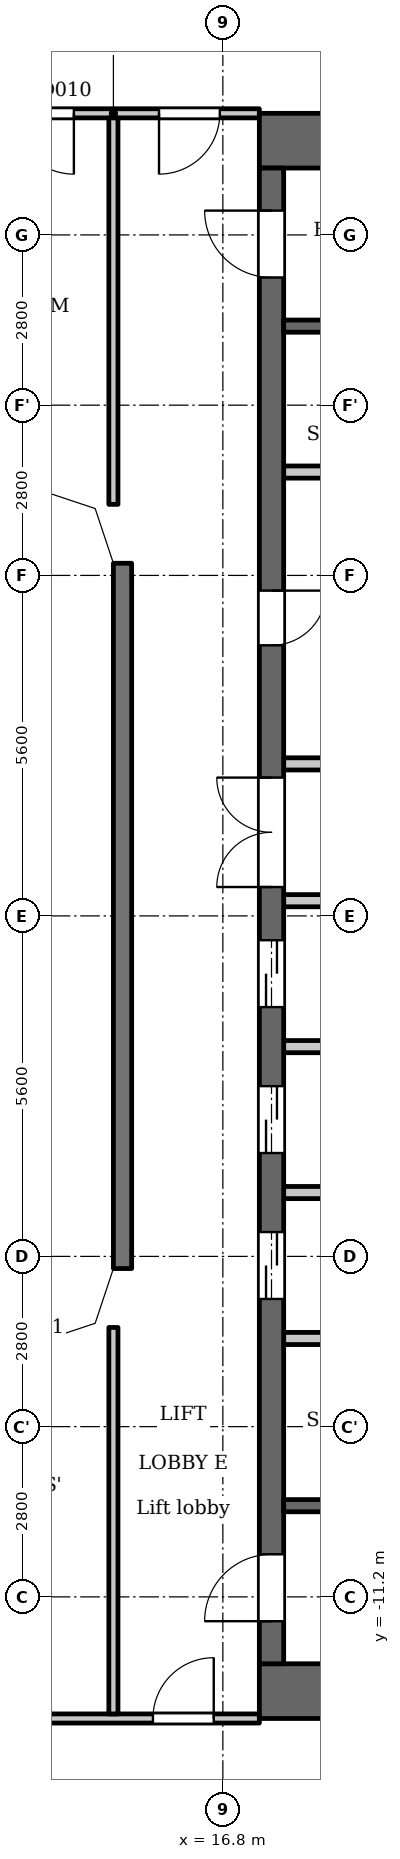
"""IFC4 building model, lengths in metres.
Left out: names, types, materials, properties, quantities, classifications, styles, units other than length and angle.
Written with IfcOpenShell. Run it as: python <this file> out.ifc"""

import sys

from ifc_helpers import new_model, si_unit, direction, frame, frame_2d, origin, place, context, subcontext, project, spatial, polyline, rectangle, outline, extrude, element, fill, save


model = new_model("IFC4")
c1 = context("Model", 3, precision=1e-05, world=origin(), true_north=direction((0.0, 1.0)))
c2 = subcontext(c1, "Body", "Model", "MODEL_VIEW")
j1 = project(units=[si_unit("LENGTHUNIT", "METRE"), si_unit("PLANEANGLEUNIT", "RADIAN")], contexts=[c1])
p1 = place(None, origin())
s1 = spatial("IfcSite", under=j1, at=p1, CompositionType="ELEMENT")
p2 = place(p1, origin())
s2 = spatial("IfcBuilding", under=s1, at=p2, CompositionType="ELEMENT")
p3 = place(p2, frame((0.0, 0.0, 37.5)))
s3 = spatial("IfcBuildingStorey", under=s2, at=p3, CompositionType="ELEMENT", Elevation=37.5)
p4 = place(p3, frame((15.15, 5.8, 0.0), z_axis=(0.0, 0.0, 1.0), x_axis=(0.0, -1.0, 0.0)))
e1 = element("IfcWall", 1, at=p4, inside=s3, PredefinedType="SOLIDWALL", context=c2, shape_type="SweptSolid", body=[
    extrude(rectangle(XDim=11.6, YDim=0.3, at=frame_2d((5.8, 0.0))), origin(), (0.0, 0.0, 1.0), 3.2),
])
for number, where, z_axis, x_axis in (
    (2, (17.4, 12.75, 0.0), (0.0, 0.0, 1.0), (1.0, 0.0, 0.0)),
    (3, (17.4, -12.75, 0.0), (0.0, 0.0, 1.0), (1.0, 0.0, 0.0)),
):
    element("IfcWall", number, at=place(p3, frame(where, z_axis=z_axis, x_axis=x_axis)), inside=s3, PredefinedType="SHEAR", context=c2, shape_type="SweptSolid", body=[
        extrude(rectangle(XDim=10.4, YDim=0.9, at=frame_2d((5.2, 0.0))), origin(), (0.0, 0.0, 1.0), 3.2),
    ])
p5 = place(p3, frame((17.6, -12.3, 0.0), z_axis=(0.0, 0.0, 1.0), x_axis=(0.0, 1.0, 0.0)))
e4 = element("IfcWall", 4, at=p5, inside=s3, PredefinedType="SHEAR", context=c2, shape_type="SweptSolid", body=[
    extrude(rectangle(XDim=24.6, YDim=0.4, at=frame_2d((12.3, 0.0))), origin(), (0.0, 0.0, 1.0), 3.2),
])
p6 = place(p5, frame((6.0, 0.0, 0.0)))
e5 = element("IfcOpeningElement", 5, at=p6, cuts=e4, PredefinedType="OPENING", context=c2, shape_type="SweptSolid", body=[
    extrude(rectangle(XDim=1.1, YDim=2.1, at=frame_2d((0.55, 1.05))), frame((0.0, 0.21, 0.0), z_axis=(0.0, -1.0, 0.0), x_axis=(1.0, 0.0, 0.0)), (0.0, 0.0, 1.0), 0.42),
])
p7 = place(p5, frame((8.4, 0.0, 0.0)))
e6 = element("IfcOpeningElement", 6, at=p7, cuts=e4, PredefinedType="OPENING", context=c2, shape_type="SweptSolid", body=[
    extrude(rectangle(XDim=1.1, YDim=2.1, at=frame_2d((0.55, 1.05))), frame((0.0, 0.21, 0.0), z_axis=(0.0, -1.0, 0.0), x_axis=(1.0, 0.0, 0.0)), (0.0, 0.0, 1.0), 0.42),
])
p8 = place(p5, frame((10.8, 0.0, 0.0)))
e7 = element("IfcOpeningElement", 7, at=p8, cuts=e4, PredefinedType="OPENING", context=c2, shape_type="SweptSolid", body=[
    extrude(rectangle(XDim=1.1, YDim=2.1, at=frame_2d((0.55, 1.05))), frame((0.0, 0.21, 0.0), z_axis=(0.0, -1.0, 0.0), x_axis=(1.0, 0.0, 0.0)), (0.0, 0.0, 1.0), 0.42),
])
p9 = place(p5, frame((16.75, 0.0, 0.0)))
e8 = element("IfcOpeningElement", 8, at=p9, cuts=e4, PredefinedType="OPENING", context=c2, shape_type="SweptSolid", body=[
    extrude(rectangle(XDim=0.9, YDim=2.1, at=frame_2d((0.45, 1.05))), frame((0.0, 0.21, 0.0), z_axis=(0.0, -1.0, 0.0), x_axis=(1.0, 0.0, 0.0)), (0.0, 0.0, 1.0), 0.42),
])
p10 = place(p5, frame((22.8, 0.0, 0.0)))
e9 = element("IfcOpeningElement", 9, at=p10, cuts=e4, PredefinedType="OPENING", context=c2, shape_type="SweptSolid", body=[
    extrude(rectangle(XDim=1.1, YDim=2.1, at=frame_2d((0.55, 1.05))), frame((0.0, 0.21, 0.0), z_axis=(0.0, -1.0, 0.0), x_axis=(1.0, 0.0, 0.0)), (0.0, 0.0, 1.0), 0.42),
])
p11 = place(p5, frame((0.7, 0.0, 0.0)))
e10 = element("IfcOpeningElement", 10, at=p11, cuts=e4, PredefinedType="OPENING", context=c2, shape_type="SweptSolid", body=[
    extrude(rectangle(XDim=1.1, YDim=2.1, at=frame_2d((0.55, 1.05))), frame((0.0, 0.21, 0.0), z_axis=(0.0, -1.0, 0.0), x_axis=(1.0, 0.0, 0.0)), (0.0, 0.0, 1.0), 0.42),
])
p12 = place(p5, frame((12.775, 0.0, 0.0)))
e11 = element("IfcOpeningElement", 11, at=p12, cuts=e4, PredefinedType="OPENING", context=c2, shape_type="SweptSolid", body=[
    extrude(rectangle(XDim=1.8, YDim=2.1, at=frame_2d((0.9, 1.05))), frame((0.0, 0.21, 0.0), z_axis=(0.0, -1.0, 0.0), x_axis=(1.0, 0.0, 0.0)), (0.0, 0.0, 1.0), 0.42),
])
p13 = place(p3, frame((17.8, -9.7, 0.0), z_axis=(0.0, 0.0, 1.0), x_axis=(1.0, 0.0, 0.0)))
e12 = element("IfcWall", 12, at=p13, inside=s3, PredefinedType="SHEAR", context=c2, shape_type="SweptSolid", body=[
    extrude(rectangle(XDim=8.3, YDim=0.2, at=frame_2d((4.15, 0.0))), origin(), (0.0, 0.0, 1.0), 3.2),
])
p14 = place(p13, frame((0.85, 0.0, 0.0)))
e13 = element("IfcOpeningElement", 13, at=p14, cuts=e12, PredefinedType="OPENING", context=c2, shape_type="SweptSolid", body=[
    extrude(rectangle(XDim=1.1, YDim=2.1, at=frame_2d((0.55, 1.05))), frame((0.0, 0.11, 0.0), z_axis=(0.0, -1.0, 0.0), x_axis=(1.0, 0.0, 0.0)), (0.0, 0.0, 1.0), 0.22),
])
p15 = place(p13, frame((3.75, 0.0, 0.0)))
e14 = element("IfcOpeningElement", 14, at=p15, cuts=e12, PredefinedType="OPENING", context=c2, shape_type="SweptSolid", body=[
    extrude(rectangle(XDim=1.1, YDim=2.1, at=frame_2d((0.55, 1.05))), frame((0.0, 0.11, 0.0), z_axis=(0.0, -1.0, 0.0), x_axis=(1.0, 0.0, 0.0)), (0.0, 0.0, 1.0), 0.22),
])
for number, where, z_axis, x_axis in (
    (15, (17.8, -6.95, 0.0), (0.0, 0.0, 1.0), (1.0, 0.0, 0.0)),
    (16, (17.8, -4.55, 0.0), (0.0, 0.0, 1.0), (1.0, 0.0, 0.0)),
    (17, (17.8, -2.15, 0.0), (0.0, 0.0, 1.0), (1.0, 0.0, 0.0)),
):
    element("IfcWall", number, at=place(p3, frame(where, z_axis=z_axis, x_axis=x_axis)), inside=s3, PredefinedType="PARTITIONING", context=c2, shape_type="SweptSolid", body=[
        extrude(rectangle(XDim=2.8, YDim=0.2, at=frame_2d((1.4, 0.0))), origin(), (0.0, 0.0, 1.0), 3.2),
    ])
for number, where, z_axis, x_axis in (
    (18, (17.8, 0.25, 0.0), (0.0, 0.0, 1.0), (1.0, 0.0, 0.0)),
    (19, (17.8, 2.5, 0.0), (0.0, 0.0, 1.0), (1.0, 0.0, 0.0)),
):
    element("IfcWall", number, at=place(p3, frame(where, z_axis=z_axis, x_axis=x_axis)), inside=s3, PredefinedType="PARTITIONING", context=c2, shape_type="SweptSolid", body=[
        extrude(rectangle(XDim=3.0, YDim=0.2, at=frame_2d((1.5, 0.0))), origin(), (0.0, 0.0, 1.0), 3.2),
    ])
p16 = place(p3, frame((17.8, 7.3, 0.0), z_axis=(0.0, 0.0, 1.0), x_axis=(1.0, 0.0, 0.0)))
e20 = element("IfcWall", 20, at=p16, inside=s3, PredefinedType="PARTITIONING", context=c2, shape_type="SweptSolid", body=[
    extrude(rectangle(XDim=2.8, YDim=0.2, at=frame_2d((1.4, 0.0))), origin(), (0.0, 0.0, 1.0), 3.2),
])
p17 = place(p3, frame((17.8, 9.7, 0.0), z_axis=(0.0, 0.0, 1.0), x_axis=(1.0, 0.0, 0.0)))
e21 = element("IfcWall", 21, at=p17, inside=s3, PredefinedType="SHEAR", context=c2, shape_type="SweptSolid", body=[
    extrude(rectangle(XDim=8.3, YDim=0.2, at=frame_2d((4.15, 0.0))), origin(), (0.0, 0.0, 1.0), 3.2),
])
p18 = place(p17, frame((0.85, 0.0, 0.0)))
e22 = element("IfcOpeningElement", 22, at=p18, cuts=e21, PredefinedType="OPENING", context=c2, shape_type="SweptSolid", body=[
    extrude(rectangle(XDim=1.1, YDim=2.1, at=frame_2d((0.55, 1.05))), frame((0.0, 0.11, 0.0), z_axis=(0.0, -1.0, 0.0), x_axis=(1.0, 0.0, 0.0)), (0.0, 0.0, 1.0), 0.22),
])
p19 = place(p17, frame((3.75, 0.0, 0.0)))
e23 = element("IfcOpeningElement", 23, at=p19, cuts=e21, PredefinedType="OPENING", context=c2, shape_type="SweptSolid", body=[
    extrude(rectangle(XDim=1.1, YDim=2.1, at=frame_2d((0.55, 1.05))), frame((0.0, 0.11, 0.0), z_axis=(0.0, -1.0, 0.0), x_axis=(1.0, 0.0, 0.0)), (0.0, 0.0, 1.0), 0.22),
])
p20 = place(p3, frame((-17.4, -13.2, 0.0), z_axis=(0.0, 0.0, 1.0), x_axis=(1.0, 0.0, 0.0)))
e24 = element("IfcWall", 24, at=p20, inside=s3, PredefinedType="PARTITIONING", context=c2, shape_type="SweptSolid", body=[
    extrude(rectangle(XDim=34.8, YDim=0.15, at=frame_2d((17.4, 0.0))), origin(), (0.0, 0.0, 1.0), 3.2),
])
p21 = place(p20, frame((0.65, 0.0, 0.0)))
e25 = element("IfcOpeningElement", 25, at=p21, cuts=e24, PredefinedType="OPENING", context=c2, shape_type="SweptSolid", body=[
    extrude(rectangle(XDim=1.0, YDim=2.1, at=frame_2d((0.5, 1.05))), frame((0.0, 0.085, 0.0), z_axis=(0.0, -1.0, 0.0), x_axis=(1.0, 0.0, 0.0)), (0.0, 0.0, 1.0), 0.17),
])
p22 = place(p20, frame((33.05, 0.0, 0.0)))
e26 = element("IfcOpeningElement", 26, at=p22, cuts=e24, PredefinedType="OPENING", context=c2, shape_type="SweptSolid", body=[
    extrude(rectangle(XDim=1.0, YDim=2.1, at=frame_2d((0.5, 1.05))), frame((0.0, 0.085, 0.0), z_axis=(0.0, -1.0, 0.0), x_axis=(1.0, 0.0, 0.0)), (0.0, 0.0, 1.0), 0.17),
])
p23 = place(p20, frame((4.55, 0.0, 0.0)))
e27 = element("IfcOpeningElement", 27, at=p23, cuts=e24, PredefinedType="OPENING", context=c2, shape_type="SweptSolid", body=[
    extrude(rectangle(XDim=1.0, YDim=2.1, at=frame_2d((0.5, 1.05))), frame((0.0, 0.085, 0.0), z_axis=(0.0, -1.0, 0.0), x_axis=(1.0, 0.0, 0.0)), (0.0, 0.0, 1.0), 0.17),
])
p24 = place(p20, frame((6.9, 0.0, 0.0)))
e28 = element("IfcOpeningElement", 28, at=p24, cuts=e24, PredefinedType="OPENING", context=c2, shape_type="SweptSolid", body=[
    extrude(rectangle(XDim=1.0, YDim=2.1, at=frame_2d((0.5, 1.05))), frame((0.0, 0.085, 0.0), z_axis=(0.0, -1.0, 0.0), x_axis=(1.0, 0.0, 0.0)), (0.0, 0.0, 1.0), 0.17),
])
p25 = place(p20, frame((15.75, 0.0, 0.0)))
e29 = element("IfcOpeningElement", 29, at=p25, cuts=e24, PredefinedType="OPENING", context=c2, shape_type="SweptSolid", body=[
    extrude(rectangle(XDim=1.0, YDim=2.1, at=frame_2d((0.5, 1.05))), frame((0.0, 0.085, 0.0), z_axis=(0.0, -1.0, 0.0), x_axis=(1.0, 0.0, 0.0)), (0.0, 0.0, 1.0), 0.17),
])
p26 = place(p20, frame((18.1, 0.0, 0.0)))
e30 = element("IfcOpeningElement", 30, at=p26, cuts=e24, PredefinedType="OPENING", context=c2, shape_type="SweptSolid", body=[
    extrude(rectangle(XDim=1.0, YDim=2.1, at=frame_2d((0.5, 1.05))), frame((0.0, 0.085, 0.0), z_axis=(0.0, -1.0, 0.0), x_axis=(1.0, 0.0, 0.0)), (0.0, 0.0, 1.0), 0.17),
])
p27 = place(p20, frame((26.95, 0.0, 0.0)))
e31 = element("IfcOpeningElement", 31, at=p27, cuts=e24, PredefinedType="OPENING", context=c2, shape_type="SweptSolid", body=[
    extrude(rectangle(XDim=1.0, YDim=2.1, at=frame_2d((0.5, 1.05))), frame((0.0, 0.085, 0.0), z_axis=(0.0, -1.0, 0.0), x_axis=(1.0, 0.0, 0.0)), (0.0, 0.0, 1.0), 0.17),
])
p28 = place(p20, frame((29.25, 0.0, 0.0)))
e32 = element("IfcOpeningElement", 32, at=p28, cuts=e24, PredefinedType="OPENING", context=c2, shape_type="SweptSolid", body=[
    extrude(rectangle(XDim=1.0, YDim=2.1, at=frame_2d((0.5, 1.05))), frame((0.0, 0.085, 0.0), z_axis=(0.0, -1.0, 0.0), x_axis=(1.0, 0.0, 0.0)), (0.0, 0.0, 1.0), 0.17),
])
p29 = place(p3, frame((-17.4, 13.2, 0.0), z_axis=(0.0, 0.0, 1.0), x_axis=(1.0, 0.0, 0.0)))
e33 = element("IfcWall", 33, at=p29, inside=s3, PredefinedType="PARTITIONING", context=c2, shape_type="SweptSolid", body=[
    extrude(rectangle(XDim=34.8, YDim=0.15, at=frame_2d((17.4, 0.0))), origin(), (0.0, 0.0, 1.0), 3.2),
])
p30 = place(p29, frame((0.75, 0.0, 0.0)))
e34 = element("IfcOpeningElement", 34, at=p30, cuts=e33, PredefinedType="OPENING", context=c2, shape_type="SweptSolid", body=[
    extrude(rectangle(XDim=1.0, YDim=2.1, at=frame_2d((0.5, 1.05))), frame((0.0, 0.085, 0.0), z_axis=(0.0, -1.0, 0.0), x_axis=(1.0, 0.0, 0.0)), (0.0, 0.0, 1.0), 0.17),
])
p31 = place(p29, frame((33.15, 0.0, 0.0)))
e35 = element("IfcOpeningElement", 35, at=p31, cuts=e33, PredefinedType="OPENING", context=c2, shape_type="SweptSolid", body=[
    extrude(rectangle(XDim=1.0, YDim=2.1, at=frame_2d((0.5, 1.05))), frame((0.0, 0.085, 0.0), z_axis=(0.0, -1.0, 0.0), x_axis=(1.0, 0.0, 0.0)), (0.0, 0.0, 1.0), 0.17),
])
p32 = place(p29, frame((3.05, 0.0, 0.0)))
e36 = element("IfcOpeningElement", 36, at=p32, cuts=e33, PredefinedType="OPENING", context=c2, shape_type="SweptSolid", body=[
    extrude(rectangle(XDim=1.0, YDim=2.1, at=frame_2d((0.5, 1.05))), frame((0.0, 0.085, 0.0), z_axis=(0.0, -1.0, 0.0), x_axis=(1.0, 0.0, 0.0)), (0.0, 0.0, 1.0), 0.17),
])
p33 = place(p29, frame((10.1, 0.0, 0.0)))
e37 = element("IfcOpeningElement", 37, at=p33, cuts=e33, PredefinedType="OPENING", context=c2, shape_type="SweptSolid", body=[
    extrude(rectangle(XDim=1.0, YDim=2.1, at=frame_2d((0.5, 1.05))), frame((0.0, 0.085, 0.0), z_axis=(0.0, -1.0, 0.0), x_axis=(1.0, 0.0, 0.0)), (0.0, 0.0, 1.0), 0.17),
])
p34 = place(p29, frame((12.45, 0.0, 0.0)))
e38 = element("IfcOpeningElement", 38, at=p34, cuts=e33, PredefinedType="OPENING", context=c2, shape_type="SweptSolid", body=[
    extrude(rectangle(XDim=1.0, YDim=2.1, at=frame_2d((0.5, 1.05))), frame((0.0, 0.085, 0.0), z_axis=(0.0, -1.0, 0.0), x_axis=(1.0, 0.0, 0.0)), (0.0, 0.0, 1.0), 0.17),
])
p35 = place(p29, frame((21.3, 0.0, 0.0)))
e39 = element("IfcOpeningElement", 39, at=p35, cuts=e33, PredefinedType="OPENING", context=c2, shape_type="SweptSolid", body=[
    extrude(rectangle(XDim=1.0, YDim=2.1, at=frame_2d((0.5, 1.05))), frame((0.0, 0.085, 0.0), z_axis=(0.0, -1.0, 0.0), x_axis=(1.0, 0.0, 0.0)), (0.0, 0.0, 1.0), 0.17),
])
p36 = place(p29, frame((23.65, 0.0, 0.0)))
e40 = element("IfcOpeningElement", 40, at=p36, cuts=e33, PredefinedType="OPENING", context=c2, shape_type="SweptSolid", body=[
    extrude(rectangle(XDim=1.0, YDim=2.1, at=frame_2d((0.5, 1.05))), frame((0.0, 0.085, 0.0), z_axis=(0.0, -1.0, 0.0), x_axis=(1.0, 0.0, 0.0)), (0.0, 0.0, 1.0), 0.17),
])
p37 = place(p29, frame((30.75, 0.0, 0.0)))
e41 = element("IfcOpeningElement", 41, at=p37, cuts=e33, PredefinedType="OPENING", context=c2, shape_type="SweptSolid", body=[
    extrude(rectangle(XDim=1.0, YDim=2.1, at=frame_2d((0.5, 1.05))), frame((0.0, 0.085, 0.0), z_axis=(0.0, -1.0, 0.0), x_axis=(1.0, 0.0, 0.0)), (0.0, 0.0, 1.0), 0.17),
])
for number, where, z_axis, x_axis in (
    (42, (15.0, -13.125, 0.0), (0.0, 0.0, 1.0), (0.0, 1.0, 0.0)),
    (43, (15.0, 6.769, 0.0), (0.0, 0.0, 1.0), (0.0, 1.0, 0.0)),
):
    element("IfcWall", number, at=place(p3, frame(where, z_axis=z_axis, x_axis=x_axis)), inside=s3, PredefinedType="PARTITIONING", context=c2, shape_type="SweptSolid", body=[
        extrude(rectangle(XDim=6.356, YDim=0.15, at=frame_2d((3.178, 0.0))), origin(), (0.0, 0.0, 1.0), 3.2),
    ])
p38 = place(p3, origin())
e44 = element("IfcWall", 44, at=p38, inside=s3, PredefinedType="SOLIDWALL", context=c2, shape_type="SweptSolid", body=[
    extrude(outline(polyline([(14.937, 6.937), (13.849, 7.3), (13.8, 7.3), (13.8, 7.0), (14.7, 6.7), (15.0, 5.8), (15.3, 5.8), (15.3, 5.849), (14.937, 6.937)])), origin(), (0.0, 0.0, 1.0), 3.2),
])
e45 = element("IfcWall", 45, at=p38, inside=s3, PredefinedType="SOLIDWALL", context=c2, shape_type="SweptSolid", body=[
    extrude(outline(polyline([(14.937, -6.937), (15.3, -5.849), (15.3, -5.8), (15.0, -5.8), (14.7, -6.7), (13.8, -7.0), (13.8, -7.3), (13.849, -7.3), (14.937, -6.937)])), origin(), (0.0, 0.0, 1.0), 3.2),
])
p39 = place(p6, origin())
e46 = element("IfcDoor", 46, at=p39, inside=s3, OperationType="DOUBLE_DOOR_SLIDING", PredefinedType="DOOR", context=c2, shape_type="SweptSolid", body=[
    extrude(rectangle(XDim=1.1, YDim=2.1, at=frame_2d((0.55, 1.05))), frame((0.0, 0.025, 0.0), z_axis=(0.0, -1.0, 0.0), x_axis=(1.0, 0.0, 0.0)), (0.0, 0.0, 1.0), 0.05),
])
fill(e5, e46)
p40 = place(p7, origin())
e47 = element("IfcDoor", 47, at=p40, inside=s3, OperationType="DOUBLE_DOOR_SLIDING", PredefinedType="DOOR", context=c2, shape_type="SweptSolid", body=[
    extrude(rectangle(XDim=1.1, YDim=2.1, at=frame_2d((0.55, 1.05))), frame((0.0, 0.025, 0.0), z_axis=(0.0, -1.0, 0.0), x_axis=(1.0, 0.0, 0.0)), (0.0, 0.0, 1.0), 0.05),
])
fill(e6, e47)
p41 = place(p8, origin())
e48 = element("IfcDoor", 48, at=p41, inside=s3, OperationType="DOUBLE_DOOR_SLIDING", PredefinedType="DOOR", context=c2, shape_type="SweptSolid", body=[
    extrude(rectangle(XDim=1.1, YDim=2.1, at=frame_2d((0.55, 1.05))), frame((0.0, 0.025, 0.0), z_axis=(0.0, -1.0, 0.0), x_axis=(1.0, 0.0, 0.0)), (0.0, 0.0, 1.0), 0.05),
])
fill(e7, e48)
p42 = place(p9, origin())
e49 = element("IfcDoor", 49, at=p42, inside=s3, OperationType="SINGLE_SWING_RIGHT", PredefinedType="DOOR", context=c2, shape_type="SweptSolid", body=[
    extrude(rectangle(XDim=0.9, YDim=2.1, at=frame_2d((0.45, 1.05))), frame((0.0, 0.025, 0.0), z_axis=(0.0, -1.0, 0.0), x_axis=(1.0, 0.0, 0.0)), (0.0, 0.0, 1.0), 0.05),
])
fill(e8, e49)
p43 = place(p10, origin())
e50 = element("IfcDoor", 50, at=p43, inside=s3, OperationType="SINGLE_SWING_LEFT", PredefinedType="DOOR", context=c2, shape_type="SweptSolid", body=[
    extrude(rectangle(XDim=1.1, YDim=2.1, at=frame_2d((0.55, 1.05))), frame((0.0, 0.025, 0.0), z_axis=(0.0, -1.0, 0.0), x_axis=(1.0, 0.0, 0.0)), (0.0, 0.0, 1.0), 0.05),
])
fill(e9, e50)
p44 = place(p11, origin())
e51 = element("IfcDoor", 51, at=p44, inside=s3, OperationType="SINGLE_SWING_RIGHT", PredefinedType="DOOR", context=c2, shape_type="SweptSolid", body=[
    extrude(rectangle(XDim=1.1, YDim=2.1, at=frame_2d((0.55, 1.05))), frame((0.0, 0.025, 0.0), z_axis=(0.0, -1.0, 0.0), x_axis=(1.0, 0.0, 0.0)), (0.0, 0.0, 1.0), 0.05),
])
fill(e10, e51)
p45 = place(p12, origin())
e52 = element("IfcDoor", 52, at=p45, inside=s3, OperationType="DOUBLE_DOOR_SINGLE_SWING", PredefinedType="DOOR", context=c2, shape_type="SweptSolid", body=[
    extrude(rectangle(XDim=1.8, YDim=2.1, at=frame_2d((0.9, 1.05))), frame((0.0, 0.025, 0.0), z_axis=(0.0, -1.0, 0.0), x_axis=(1.0, 0.0, 0.0)), (0.0, 0.0, 1.0), 0.05),
])
fill(e11, e52)
p46 = place(p31, origin())
e53 = element("IfcDoor", 53, at=p46, inside=s3, OperationType="SINGLE_SWING_LEFT", PredefinedType="DOOR", context=c2, shape_type="SweptSolid", body=[
    extrude(rectangle(XDim=1.0, YDim=2.1, at=frame_2d((0.5, 1.05))), frame((0.0, 0.025, 0.0), z_axis=(0.0, -1.0, 0.0), x_axis=(1.0, 0.0, 0.0)), (0.0, 0.0, 1.0), 0.05),
])
fill(e35, e53)
p47 = place(p22, origin())
e54 = element("IfcDoor", 54, at=p47, inside=s3, OperationType="SINGLE_SWING_LEFT", PredefinedType="DOOR", context=c2, shape_type="SweptSolid", body=[
    extrude(rectangle(XDim=1.0, YDim=2.1, at=frame_2d((0.5, 1.05))), frame((0.0, 0.025, 0.0), z_axis=(0.0, -1.0, 0.0), x_axis=(1.0, 0.0, 0.0)), (0.0, 0.0, 1.0), 0.05),
])
fill(e26, e54)
p48 = place(p37, origin())
e55 = element("IfcDoor", 55, at=p48, inside=s3, OperationType="SINGLE_SWING_RIGHT", PredefinedType="DOOR", context=c2, shape_type="SweptSolid", body=[
    extrude(rectangle(XDim=1.0, YDim=2.1, at=frame_2d((0.5, 1.05))), frame((0.0, 0.025, 0.0), z_axis=(0.0, -1.0, 0.0), x_axis=(1.0, 0.0, 0.0)), (0.0, 0.0, 1.0), 0.05),
])
fill(e41, e55)
save(model, sys.argv[1])
